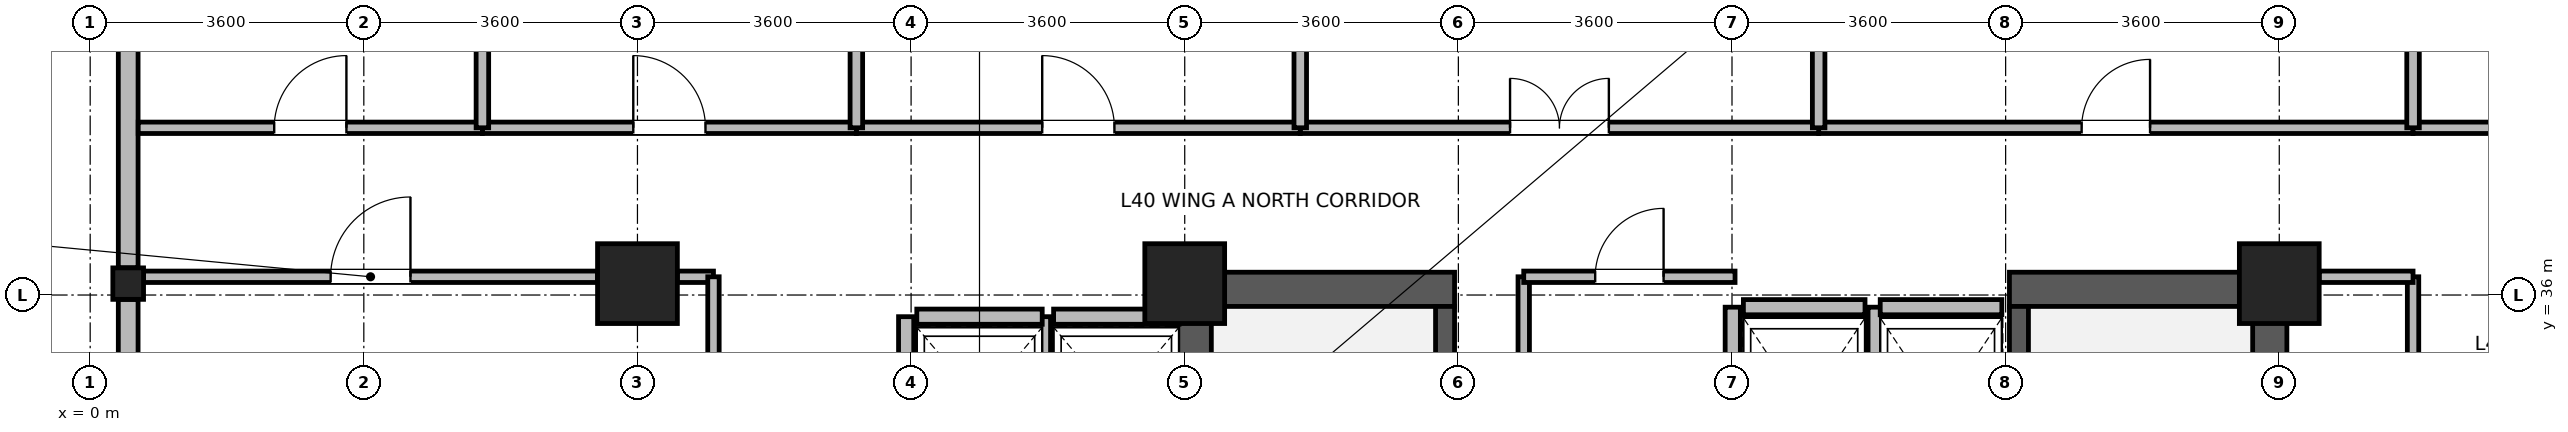
"""IFC4 building model, lengths in metres.
Left out: names, types, materials, properties, quantities, classifications, styles, units other than length and angle.
Written with IfcOpenShell. Run it as: python <this file> out.ifc"""

import sys

from ifc_helpers import new_model, si_unit, direction, frame, frame_2d, origin, origin_2d, place, context, subcontext, project, spatial, rectangle, i_section, extrude, source, transform, mapped, element, fill, save


model = new_model("IFC4")
c1 = context("Model", 3, precision=1e-05, world=origin(), true_north=direction((0.0, 1.0)))
c2 = subcontext(c1, "Body", "Model", "MODEL_VIEW")
j1 = project(units=[si_unit("LENGTHUNIT", "METRE"), si_unit("PLANEANGLEUNIT", "RADIAN")], contexts=[c1])
p1 = place(None, origin())
s1 = spatial("IfcSite", under=j1, at=p1, CompositionType="ELEMENT")
p2 = place(p1, origin())
s2 = spatial("IfcBuilding", under=s1, at=p2, CompositionType="ELEMENT")
p3 = place(p2, frame((0.0, 0.0, 158.7)))
s3 = spatial("IfcBuildingStorey", under=s2, at=p3, CompositionType="ELEMENT", Elevation=158.7)
for number, where, z_axis, x_axis in (
    (1, (14.525, 28.4, 0.0), (0.0, 0.0, 1.0), (0.0, 1.0, 0.0)),
    (2, (28.675, 28.4, 0.0), (0.0, 0.0, 1.0), (0.0, 1.0, 0.0)),
):
    element("IfcWall", number, at=place(p3, frame(where, z_axis=z_axis, x_axis=x_axis)), inside=s3, PredefinedType="SHEAR", context=c2, shape_type="SweptSolid", body=[
        extrude(rectangle(XDim=7.9, YDim=0.45, at=frame_2d((3.95, 0.0))), origin(), (0.0, 0.0, 1.0), 3.46),
    ])
for number, where, z_axis, x_axis in (
    (3, (14.75, 36.075, 0.0), (0.0, 0.0, 1.0), (1.0, 0.0, 0.0)),
    (4, (25.25, 36.075, 0.0), (0.0, 0.0, 1.0), (1.0, 0.0, 0.0)),
):
    element("IfcWall", number, at=place(p3, frame(where, z_axis=z_axis, x_axis=x_axis)), inside=s3, PredefinedType="SHEAR", context=c2, shape_type="SweptSolid", body=[
        extrude(rectangle(XDim=3.2, YDim=0.45, at=frame_2d((1.6, 0.0))), origin(), (0.0, 0.0, 1.0), 3.46),
    ])
p4 = place(p3, frame((17.825, 28.85, 0.0), z_axis=(0.0, 0.0, 1.0), x_axis=(0.0, 1.0, 0.0)))
e5 = element("IfcWall", 5, at=p4, inside=s3, PredefinedType="SHEAR", context=c2, shape_type="SweptSolid", body=[
    extrude(rectangle(XDim=7.0, YDim=0.25, at=frame_2d((3.5, 0.0))), origin(), (0.0, 0.0, 1.0), 3.46),
])
p5 = place(p4, frame((0.15, 0.0, 0.0)))
e6 = element("IfcOpeningElement", 6, at=p5, cuts=e5, PredefinedType="OPENING", context=c2, shape_type="SweptSolid", body=[
    extrude(rectangle(XDim=1.1, YDim=2.08, at=frame_2d((0.55, 1.04))), frame((0.0, 0.135, 0.0), z_axis=(0.0, -1.0, 0.0), x_axis=(1.0, 0.0, 0.0)), (0.0, 0.0, 1.0), 0.27),
])
p6 = place(p3, frame((25.375, 28.85, 0.0), z_axis=(0.0, 0.0, 1.0), x_axis=(0.0, 1.0, 0.0)))
e7 = element("IfcWall", 7, at=p6, inside=s3, PredefinedType="SHEAR", context=c2, shape_type="SweptSolid", body=[
    extrude(rectangle(XDim=7.0, YDim=0.25, at=frame_2d((3.5, 0.0))), origin(), (0.0, 0.0, 1.0), 3.46),
])
p7 = place(p6, frame((0.15, 0.0, 0.0)))
e8 = element("IfcOpeningElement", 8, at=p7, cuts=e7, PredefinedType="OPENING", context=c2, shape_type="SweptSolid", body=[
    extrude(rectangle(XDim=1.1, YDim=2.08, at=frame_2d((0.55, 1.04))), frame((0.0, 0.135, 0.0), z_axis=(0.0, -1.0, 0.0), x_axis=(1.0, 0.0, 0.0)), (0.0, 0.0, 1.0), 0.27),
])
m1 = source(origin(), c2, "Body", "SweptSolid", [
    extrude(rectangle(XDim=1.05, YDim=1.05, at=origin_2d()), origin(), (0.0, 0.0, 1.0), 3.7),
])
for number, where, z_axis, x_axis in (
    (9, (7.2, 36.15, 0.0), (0.0, 0.0, 1.0), (1.0, 0.0, 0.0)),
    (10, (14.4, 36.15, 0.0), (0.0, 0.0, 1.0), (1.0, 0.0, 0.0)),
    (11, (28.8, 36.15, 0.0), (0.0, 0.0, 1.0), (1.0, 0.0, 0.0)),
):
    element("IfcColumn", number, at=place(p3, frame(where, z_axis=z_axis, x_axis=x_axis)), inside=s3, PredefinedType="COLUMN", context=c2, shape_type="MappedRepresentation", body=[
        mapped(m1, transform((0.0, 0.0, 0.0), x_axis=(1.0, 0.0, 0.0), y_axis=(0.0, 1.0, 0.0), z_axis=(0.0, 0.0, 1.0), scale=1.0)),
    ])
m2 = source(origin(), c2, "Body", "SweptSolid", [
    extrude(i_section(OverallWidth=0.404, OverallDepth=0.414, WebThickness=0.021, FlangeThickness=0.028, FilletRadius=0.015, at=origin_2d()), origin(), (0.0, 0.0, 1.0), 3.7),
])
p8 = place(p3, frame((0.5, 36.15, 0.0), z_axis=(0.0, 0.0, 1.0), x_axis=(1.0, 0.0, 0.0)))
e12 = element("IfcColumn", 12, at=p8, inside=s3, PredefinedType="COLUMN", context=c2, shape_type="MappedRepresentation", body=[
    mapped(m2, transform((0.0, 0.0, 0.0), x_axis=(1.0, 0.0, 0.0), y_axis=(0.0, 1.0, 0.0), z_axis=(0.0, 0.0, 1.0), scale=1.0)),
])
p9 = place(p3, frame((0.5, 36.358, 0.0), z_axis=(0.0, 0.0, 1.0), x_axis=(0.0, 1.0, 0.0)))
e13 = element("IfcWall", 13, at=p9, inside=s3, PredefinedType="STANDARD", context=c2, shape_type="SweptSolid", body=[
    extrude(rectangle(XDim=6.972, YDim=0.26, at=frame_2d((3.486, 0.0))), origin(), (0.0, 0.0, 1.0), 3.44),
])
p10 = place(p9, frame((4.329, 0.0, 0.85)))
e14 = element("IfcOpeningElement", 14, at=p10, cuts=e13, PredefinedType="OPENING", context=c2, shape_type="SweptSolid", body=[
    extrude(rectangle(XDim=1.8, YDim=1.85, at=frame_2d((0.9, 0.925))), frame((0.0, 0.14, 0.0), z_axis=(0.0, -1.0, 0.0), x_axis=(1.0, 0.0, 0.0)), (0.0, 0.0, 1.0), 0.28),
])
p11 = place(p9, frame((3.011, 0.0, 0.85)))
e15 = element("IfcOpeningElement", 15, at=p11, cuts=e13, PredefinedType="OPENING", context=c2, shape_type="SweptSolid", body=[
    extrude(rectangle(XDim=0.95, YDim=1.75, at=frame_2d((0.475, 0.875))), frame((0.0, 0.14, 0.0), z_axis=(0.0, -1.0, 0.0), x_axis=(1.0, 0.0, 0.0)), (0.0, 0.0, 1.0), 0.28),
])
p12 = place(p3, frame((0.5, 28.858, 0.0), z_axis=(0.0, 0.0, 1.0), x_axis=(0.0, 1.0, 0.0)))
e16 = element("IfcWall", 16, at=p12, inside=s3, PredefinedType="STANDARD", context=c2, shape_type="SweptSolid", body=[
    extrude(rectangle(XDim=7.084, YDim=0.26, at=frame_2d((3.542, 0.0))), origin(), (0.0, 0.0, 1.0), 2.99),
])
p13 = place(p12, frame((0.871, 0.0, 0.85)))
e17 = element("IfcOpeningElement", 17, at=p13, cuts=e16, PredefinedType="OPENING", context=c2, shape_type="SweptSolid", body=[
    extrude(rectangle(XDim=1.8, YDim=1.85, at=frame_2d((0.9, 0.925))), frame((0.0, 0.14, 0.0), z_axis=(0.0, -1.0, 0.0), x_axis=(1.0, 0.0, 0.0)), (0.0, 0.0, 1.0), 0.28),
])
p14 = place(p12, frame((4.413, 0.0, 0.85)))
e18 = element("IfcOpeningElement", 18, at=p14, cuts=e16, PredefinedType="OPENING", context=c2, shape_type="SweptSolid", body=[
    extrude(rectangle(XDim=1.8, YDim=1.85, at=frame_2d((0.9, 0.925))), frame((0.0, 0.14, 0.0), z_axis=(0.0, -1.0, 0.0), x_axis=(1.0, 0.0, 0.0)), (0.0, 0.0, 1.0), 0.28),
])
p15 = place(p3, frame((12.675, 35.715, 0.0), z_axis=(0.0, 0.0, 1.0), x_axis=(1.0, 0.0, 0.0)))
e19 = element("IfcWall", 19, at=p15, inside=s3, PredefinedType="PARTITIONING", context=c2, shape_type="SweptSolid", body=[
    extrude(rectangle(XDim=1.65, YDim=0.2, at=frame_2d((0.825, 0.0))), origin(), (0.0, 0.0, 1.0), 3.44),
])
p16 = place(p3, frame((12.535, 33.485, 0.0), z_axis=(0.0, 0.0, 1.0), x_axis=(0.0, 1.0, 0.0)))
e20 = element("IfcWall", 20, at=p16, inside=s3, PredefinedType="PARTITIONING", context=c2, shape_type="SweptSolid", body=[
    extrude(rectangle(XDim=2.23, YDim=0.2, at=frame_2d((1.115, 0.0))), origin(), (0.0, 0.0, 1.0), 3.44),
])
p17 = place(p3, frame((10.875, 35.715, 0.0), z_axis=(0.0, 0.0, 1.0), x_axis=(1.0, 0.0, 0.0)))
e21 = element("IfcWall", 21, at=p17, inside=s3, PredefinedType="PARTITIONING", context=c2, shape_type="SweptSolid", body=[
    extrude(rectangle(XDim=1.65, YDim=0.2, at=frame_2d((0.825, 0.0))), origin(), (0.0, 0.0, 1.0), 3.44),
])
p18 = place(p3, frame((10.735, 33.485, 0.0), z_axis=(0.0, 0.0, 1.0), x_axis=(0.0, 1.0, 0.0)))
e22 = element("IfcWall", 22, at=p18, inside=s3, PredefinedType="PARTITIONING", context=c2, shape_type="SweptSolid", body=[
    extrude(rectangle(XDim=2.23, YDim=0.2, at=frame_2d((1.115, 0.0))), origin(), (0.0, 0.0, 1.0), 3.44),
])
p19 = place(p3, frame((21.75, 35.84, 0.0), z_axis=(0.0, 0.0, 1.0), x_axis=(1.0, 0.0, 0.0)))
e23 = element("IfcWall", 23, at=p19, inside=s3, PredefinedType="PARTITIONING", context=c2, shape_type="SweptSolid", body=[
    extrude(rectangle(XDim=1.6, YDim=0.2, at=frame_2d((0.8, 0.0))), origin(), (0.0, 0.0, 1.0), 2.44),
])
for number, where, z_axis, x_axis in (
    (24, (21.61, 33.16, 0.0), (0.0, 0.0, 1.0), (0.0, 1.0, 0.0)),
    (25, (23.49, 33.16, 0.0), (0.0, 0.0, 1.0), (0.0, 1.0, 0.0)),
):
    element("IfcWall", number, at=place(p3, frame(where, z_axis=z_axis, x_axis=x_axis)), inside=s3, PredefinedType="PARTITIONING", context=c2, shape_type="SweptSolid", body=[
        extrude(rectangle(XDim=2.68, YDim=0.2, at=frame_2d((1.34, 0.0))), origin(), (0.0, 0.0, 1.0), 3.44),
    ])
p20 = place(p3, frame((23.55, 35.84, 0.0), z_axis=(0.0, 0.0, 1.0), x_axis=(1.0, 0.0, 0.0)))
e26 = element("IfcWall", 26, at=p20, inside=s3, PredefinedType="PARTITIONING", context=c2, shape_type="SweptSolid", body=[
    extrude(rectangle(XDim=1.6, YDim=0.2, at=frame_2d((0.8, 0.0))), origin(), (0.0, 0.0, 1.0), 2.44),
])
p21 = place(p3, frame((22.74, 38.2, 0.0), z_axis=(0.0, 0.0, 1.0), x_axis=(1.0, 0.0, 0.0)))
e27 = element("IfcWall", 27, at=p21, inside=s3, PredefinedType="PARTITIONING", context=c2, shape_type="SweptSolid", body=[
    extrude(rectangle(XDim=7.82, YDim=0.15, at=frame_2d((3.91, 0.0))), origin(), (0.0, 0.0, 1.0), 3.44),
])
p22 = place(p21, frame((3.46, 0.0, 0.0)))
e28 = element("IfcOpeningElement", 28, at=p22, cuts=e27, PredefinedType="OPENING", context=c2, shape_type="SweptSolid", body=[
    extrude(rectangle(XDim=0.9, YDim=2.08, at=frame_2d((0.45, 1.04))), frame((0.0, 0.085, 0.0), z_axis=(0.0, -1.0, 0.0), x_axis=(1.0, 0.0, 0.0)), (0.0, 0.0, 1.0), 0.17),
])
p23 = place(p3, frame((0.702, 36.24, 0.0), z_axis=(0.0, 0.0, 1.0), x_axis=(1.0, 0.0, 0.0)))
e29 = element("IfcWall", 29, at=p23, inside=s3, PredefinedType="PARTITIONING", context=c2, shape_type="SweptSolid", body=[
    extrude(rectangle(XDim=5.973, YDim=0.15, at=frame_2d((2.987, 0.0))), origin(), (0.0, 0.0, 1.0), 2.84),
])
p24 = place(p23, frame((2.461, 0.0, 0.0)))
e30 = element("IfcOpeningElement", 30, at=p24, cuts=e29, PredefinedType="OPENING", context=c2, shape_type="SweptSolid", body=[
    extrude(rectangle(XDim=1.05, YDim=2.12, at=frame_2d((0.525, 1.06))), frame((0.0, 0.085, 0.0), z_axis=(0.0, -1.0, 0.0), x_axis=(1.0, 0.0, 0.0)), (0.0, 0.0, 1.0), 0.17),
])
p25 = place(p3, frame((7.725, 36.24, 0.0), z_axis=(0.0, 0.0, 1.0), x_axis=(1.0, 0.0, 0.0)))
e31 = element("IfcWall", 31, at=p25, inside=s3, PredefinedType="PARTITIONING", context=c2, shape_type="SweptSolid", body=[
    extrude(rectangle(XDim=0.475, YDim=0.15, at=frame_2d((0.237, 0.0))), origin(), (0.0, 0.0, 1.0), 2.84),
])
p26 = place(p3, frame((15.92, 38.2, 0.0), z_axis=(0.0, 0.0, 1.0), x_axis=(1.0, 0.0, 0.0)))
e32 = element("IfcWall", 32, at=p26, inside=s3, PredefinedType="PARTITIONING", context=c2, shape_type="SweptSolid", body=[
    extrude(rectangle(XDim=6.82, YDim=0.15, at=frame_2d((3.41, 0.0))), origin(), (0.0, 0.0, 1.0), 3.44),
])
p27 = place(p26, frame((2.76, 0.0, 0.0)))
e33 = element("IfcOpeningElement", 33, at=p27, cuts=e32, PredefinedType="OPENING", context=c2, shape_type="SweptSolid", body=[
    extrude(rectangle(XDim=1.3, YDim=2.12, at=frame_2d((0.65, 1.06))), frame((0.0, 0.085, 0.0), z_axis=(0.0, -1.0, 0.0), x_axis=(1.0, 0.0, 0.0)), (0.0, 0.0, 1.0), 0.17),
])
p28 = place(p3, frame((10.08, 38.2, 0.0), z_axis=(0.0, 0.0, 1.0), x_axis=(1.0, 0.0, 0.0)))
e34 = element("IfcWall", 34, at=p28, inside=s3, PredefinedType="PARTITIONING", context=c2, shape_type="SweptSolid", body=[
    extrude(rectangle(XDim=5.84, YDim=0.15, at=frame_2d((2.92, 0.0))), origin(), (0.0, 0.0, 1.0), 3.44),
])
p29 = place(p28, frame((2.445, 0.0, 0.0)))
e35 = element("IfcOpeningElement", 35, at=p29, cuts=e34, PredefinedType="OPENING", context=c2, shape_type="SweptSolid", body=[
    extrude(rectangle(XDim=0.95, YDim=2.1, at=frame_2d((0.475, 1.05))), frame((0.0, 0.085, 0.0), z_axis=(0.0, -1.0, 0.0), x_axis=(1.0, 0.0, 0.0)), (0.0, 0.0, 1.0), 0.17),
])
p30 = place(p3, frame((5.16, 38.2, 0.0), z_axis=(0.0, 0.0, 1.0), x_axis=(1.0, 0.0, 0.0)))
e36 = element("IfcWall", 36, at=p30, inside=s3, PredefinedType="PARTITIONING", context=c2, shape_type="SweptSolid", body=[
    extrude(rectangle(XDim=4.92, YDim=0.15, at=frame_2d((2.46, 0.0))), origin(), (0.0, 0.0, 1.0), 3.44),
])
p31 = place(p30, frame((1.985, 0.0, 0.0)))
e37 = element("IfcOpeningElement", 37, at=p31, cuts=e36, PredefinedType="OPENING", context=c2, shape_type="SweptSolid", body=[
    extrude(rectangle(XDim=0.95, YDim=2.1, at=frame_2d((0.475, 1.05))), frame((0.0, 0.085, 0.0), z_axis=(0.0, -1.0, 0.0), x_axis=(1.0, 0.0, 0.0)), (0.0, 0.0, 1.0), 0.17),
])
p32 = place(p3, frame((30.56, 38.2, 0.0), z_axis=(0.0, 0.0, 1.0), x_axis=(1.0, 0.0, 0.0)))
e38 = element("IfcWall", 38, at=p32, inside=s3, PredefinedType="PARTITIONING", context=c2, shape_type="SweptSolid", body=[
    extrude(rectangle(XDim=4.8, YDim=0.15, at=frame_2d((2.4, 0.0))), origin(), (0.0, 0.0, 1.0), 3.44),
])
p33 = place(p32, frame((1.75, 0.0, 0.0)))
e39 = element("IfcOpeningElement", 39, at=p33, cuts=e38, PredefinedType="OPENING", context=c2, shape_type="SweptSolid", body=[
    extrude(rectangle(XDim=1.3, YDim=2.12, at=frame_2d((0.65, 1.06))), frame((0.0, 0.085, 0.0), z_axis=(0.0, -1.0, 0.0), x_axis=(1.0, 0.0, 0.0)), (0.0, 0.0, 1.0), 0.17),
])
p34 = place(p3, frame((0.632, 38.2, 0.0), z_axis=(0.0, 0.0, 1.0), x_axis=(1.0, 0.0, 0.0)))
e40 = element("IfcWall", 40, at=p34, inside=s3, PredefinedType="PARTITIONING", context=c2, shape_type="SweptSolid", body=[
    extrude(rectangle(XDim=4.528, YDim=0.15, at=frame_2d((2.264, 0.0))), origin(), (0.0, 0.0, 1.0), 3.44),
])
p35 = place(p34, frame((1.789, 0.0, 0.0)))
e41 = element("IfcOpeningElement", 41, at=p35, cuts=e40, PredefinedType="OPENING", context=c2, shape_type="SweptSolid", body=[
    extrude(rectangle(XDim=0.95, YDim=2.1, at=frame_2d((0.475, 1.05))), frame((0.0, 0.085, 0.0), z_axis=(0.0, -1.0, 0.0), x_axis=(1.0, 0.0, 0.0)), (0.0, 0.0, 1.0), 0.17),
])
p36 = place(p3, frame((30.56, 31.64, 0.0), z_axis=(0.0, 0.0, 1.0), x_axis=(0.0, 1.0, 0.0)))
e42 = element("IfcWall", 42, at=p36, inside=s3, PredefinedType="PARTITIONING", context=c2, shape_type="SweptSolid", body=[
    extrude(rectangle(XDim=4.6, YDim=0.15, at=frame_2d((2.3, 0.0))), origin(), (0.0, 0.0, 1.0), 3.44),
])
p37 = place(p36, frame((1.65, 0.0, 0.0)))
e43 = element("IfcOpeningElement", 43, at=p37, cuts=e42, PredefinedType="OPENING", context=c2, shape_type="SweptSolid", body=[
    extrude(rectangle(XDim=1.3, YDim=2.12, at=frame_2d((0.65, 1.06))), frame((0.0, 0.085, 0.0), z_axis=(0.0, -1.0, 0.0), x_axis=(1.0, 0.0, 0.0)), (0.0, 0.0, 1.0), 0.17),
])
p38 = place(p3, frame((8.2, 32.4, 0.0), z_axis=(0.0, 0.0, 1.0), x_axis=(0.0, 1.0, 0.0)))
e44 = element("IfcWall", 44, at=p38, inside=s3, PredefinedType="PARTITIONING", context=c2, shape_type="SweptSolid", body=[
    extrude(rectangle(XDim=3.84, YDim=0.15, at=frame_2d((1.92, 0.0))), origin(), (0.0, 0.0, 1.0), 3.44),
])
p39 = place(p3, frame((18.86, 33.36, 0.0), z_axis=(0.0, 0.0, 1.0), x_axis=(0.0, 1.0, 0.0)))
e45 = element("IfcWall", 45, at=p39, inside=s3, PredefinedType="PARTITIONING", context=c2, shape_type="SweptSolid", body=[
    extrude(rectangle(XDim=2.88, YDim=0.15, at=frame_2d((1.44, 0.0))), origin(), (0.0, 0.0, 1.0), 3.44),
])
p40 = place(p3, frame((18.86, 36.24, 0.0), z_axis=(0.0, 0.0, 1.0), x_axis=(1.0, 0.0, 0.0)))
e46 = element("IfcWall", 46, at=p40, inside=s3, PredefinedType="PARTITIONING", context=c2, shape_type="SweptSolid", body=[
    extrude(rectangle(XDim=2.78, YDim=0.15, at=frame_2d((1.39, 0.0))), origin(), (0.0, 0.0, 1.0), 2.44),
])
p41 = place(p40, frame((0.94, 0.0, 0.0)))
e47 = element("IfcOpeningElement", 47, at=p41, cuts=e46, PredefinedType="OPENING", context=c2, shape_type="SweptSolid", body=[
    extrude(rectangle(XDim=0.9, YDim=2.08, at=frame_2d((0.45, 1.04))), frame((0.0, 0.085, 0.0), z_axis=(0.0, -1.0, 0.0), x_axis=(1.0, 0.0, 0.0)), (0.0, 0.0, 1.0), 0.17),
])
p42 = place(p3, frame((29.325, 36.24, 0.0), z_axis=(0.0, 0.0, 1.0), x_axis=(1.0, 0.0, 0.0)))
e48 = element("IfcWall", 48, at=p42, inside=s3, PredefinedType="PARTITIONING", context=c2, shape_type="SweptSolid", body=[
    extrude(rectangle(XDim=1.235, YDim=0.15, at=frame_2d((0.618, 0.0))), origin(), (0.0, 0.0, 1.0), 2.84),
])
for number, where, z_axis, x_axis in (
    (49, (15.92, 38.2, 0.0), (0.0, 0.0, 1.0), (0.0, 1.0, 0.0)),
    (50, (22.74, 38.2, 0.0), (0.0, 0.0, 1.0), (0.0, 1.0, 0.0)),
    (51, (30.56, 38.2, 0.0), (0.0, 0.0, 1.0), (0.0, 1.0, 0.0)),
):
    element("IfcWall", number, at=place(p3, frame(where, z_axis=z_axis, x_axis=x_axis)), inside=s3, PredefinedType="PARTITIONING", context=c2, shape_type="SweptSolid", body=[
        extrude(rectangle(XDim=4.868, YDim=0.165, at=frame_2d((2.434, 0.0))), origin(), (0.0, 0.0, 1.0), 3.44),
    ])
for number, where, z_axis, x_axis in (
    (52, (5.16, 38.2, 0.0), (0.0, 0.0, 1.0), (0.0, 1.0, 0.0)),
    (53, (10.08, 38.2, 0.0), (0.0, 0.0, 1.0), (0.0, 1.0, 0.0)),
):
    element("IfcWall", number, at=place(p3, frame(where, z_axis=z_axis, x_axis=x_axis)), inside=s3, PredefinedType="PARTITIONING", context=c2, shape_type="SweptSolid", body=[
        extrude(rectangle(XDim=3.1, YDim=0.165, at=frame_2d((1.55, 0.0))), origin(), (0.0, 0.0, 1.0), 3.44),
    ])
p43 = place(p22, origin())
e54 = element("IfcDoor", 54, at=p43, inside=s3, OperationType="SINGLE_SWING_RIGHT", PredefinedType="DOOR", context=c2, shape_type="SweptSolid", body=[
    extrude(rectangle(XDim=0.9, YDim=2.08, at=frame_2d((0.45, 1.04))), frame((0.0, 0.025, 0.0), z_axis=(0.0, -1.0, 0.0), x_axis=(1.0, 0.0, 0.0)), (0.0, 0.0, 1.0), 0.05),
])
fill(e28, e54)
p44 = place(p24, origin())
e55 = element("IfcDoor", 55, at=p44, inside=s3, OperationType="SINGLE_SWING_RIGHT", PredefinedType="DOOR", context=c2, shape_type="SweptSolid", body=[
    extrude(rectangle(XDim=1.05, YDim=2.12, at=frame_2d((0.525, 1.06))), frame((0.0, 0.025, 0.0), z_axis=(0.0, -1.0, 0.0), x_axis=(1.0, 0.0, 0.0)), (0.0, 0.0, 1.0), 0.05),
])
fill(e30, e55)
p45 = place(p27, origin())
e56 = element("IfcDoor", 56, at=p45, inside=s3, OperationType="DOUBLE_DOOR_SINGLE_SWING", PredefinedType="DOOR", context=c2, shape_type="SweptSolid", body=[
    extrude(rectangle(XDim=1.3, YDim=2.12, at=frame_2d((0.65, 1.06))), frame((0.0, 0.025, 0.0), z_axis=(0.0, -1.0, 0.0), x_axis=(1.0, 0.0, 0.0)), (0.0, 0.0, 1.0), 0.05),
])
fill(e33, e56)
p46 = place(p29, origin())
e57 = element("IfcDoor", 57, at=p46, inside=s3, OperationType="SINGLE_SWING_LEFT", PredefinedType="DOOR", context=c2, shape_type="SweptSolid", body=[
    extrude(rectangle(XDim=0.95, YDim=2.1, at=frame_2d((0.475, 1.05))), frame((0.0, 0.025, 0.0), z_axis=(0.0, -1.0, 0.0), x_axis=(1.0, 0.0, 0.0)), (0.0, 0.0, 1.0), 0.05),
])
fill(e35, e57)
p47 = place(p31, origin())
e58 = element("IfcDoor", 58, at=p47, inside=s3, OperationType="SINGLE_SWING_LEFT", PredefinedType="DOOR", context=c2, shape_type="SweptSolid", body=[
    extrude(rectangle(XDim=0.95, YDim=2.1, at=frame_2d((0.475, 1.05))), frame((0.0, 0.025, 0.0), z_axis=(0.0, -1.0, 0.0), x_axis=(1.0, 0.0, 0.0)), (0.0, 0.0, 1.0), 0.05),
])
fill(e37, e58)
p48 = place(p35, origin())
e59 = element("IfcDoor", 59, at=p48, inside=s3, OperationType="SINGLE_SWING_RIGHT", PredefinedType="DOOR", context=c2, shape_type="SweptSolid", body=[
    extrude(rectangle(XDim=0.95, YDim=2.1, at=frame_2d((0.475, 1.05))), frame((0.0, 0.025, 0.0), z_axis=(0.0, -1.0, 0.0), x_axis=(1.0, 0.0, 0.0)), (0.0, 0.0, 1.0), 0.05),
])
fill(e41, e59)
p49 = place(p41, origin())
e60 = element("IfcDoor", 60, at=p49, inside=s3, OperationType="SINGLE_SWING_RIGHT", PredefinedType="DOOR", context=c2, shape_type="SweptSolid", body=[
    extrude(rectangle(XDim=0.9, YDim=2.08, at=frame_2d((0.45, 1.04))), frame((0.0, 0.025, 0.0), z_axis=(0.0, -1.0, 0.0), x_axis=(1.0, 0.0, 0.0)), (0.0, 0.0, 1.0), 0.05),
])
fill(e47, e60)
save(model, sys.argv[1])
